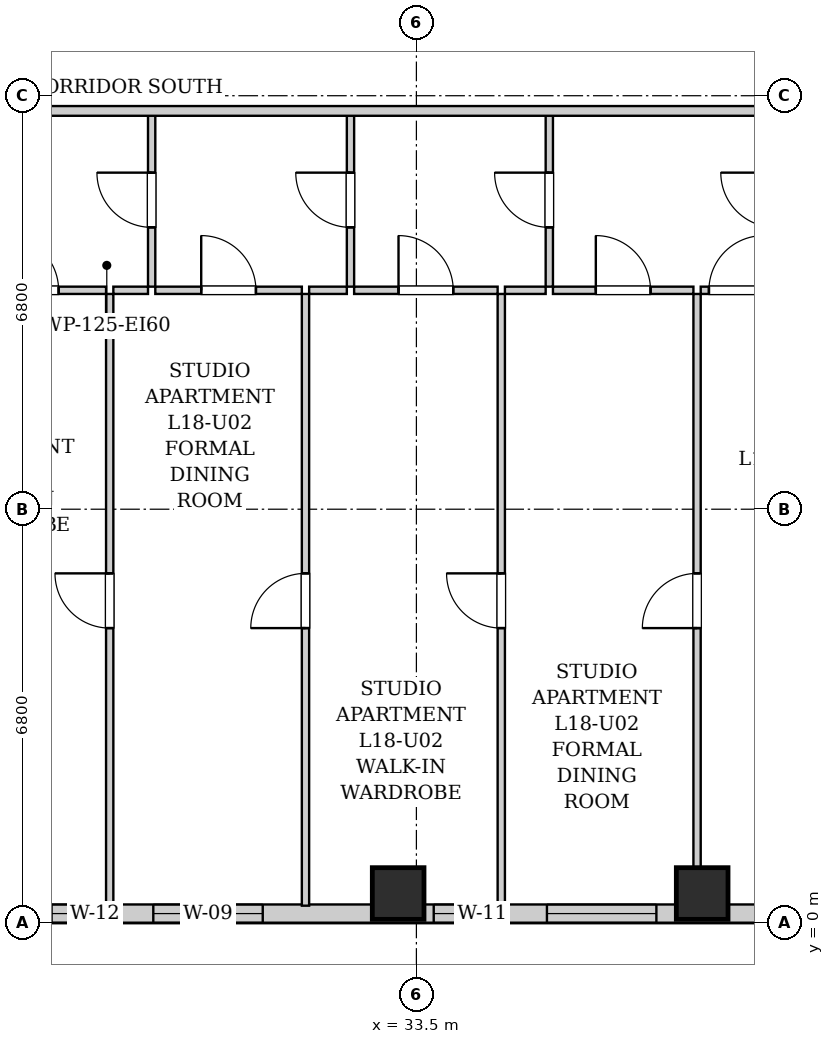
"""IFC4 building model, lengths in metres.
Left out: names, types, materials, properties, quantities, classifications, styles, units other than length and angle.
Written with IfcOpenShell. Run it as: python <this file> out.ifc"""

import sys

from ifc_helpers import new_model, si_unit, direction, frame, frame_2d, origin, origin_2d, place, context, subcontext, project, spatial, rectangle, extrude, element, fill, save


model = new_model("IFC4")
c1 = context("Model", 3, precision=1e-05, world=origin(), true_north=direction((0.0, 1.0)))
c2 = subcontext(c1, "Body", "Model", "MODEL_VIEW")
j1 = project(units=[si_unit("LENGTHUNIT", "METRE"), si_unit("PLANEANGLEUNIT", "RADIAN")], contexts=[c1])
p1 = place(None, origin())
s1 = spatial("IfcSite", under=j1, at=p1, CompositionType="ELEMENT")
p2 = place(p1, origin())
s2 = spatial("IfcBuilding", under=s1, at=p2, CompositionType="ELEMENT")
p3 = place(p2, frame((0.0, 0.0, 67.4)))
s3 = spatial("IfcBuildingStorey", under=s2, at=p3, CompositionType="ELEMENT", Elevation=67.4)
for number, where, z_axis, x_axis in (
    (1, (33.2, 0.48, 0.0), (0.0, 0.0, 1.0), (1.0, 0.0, 0.0)),
    (2, (38.2, 0.48, 0.0), (0.0, 0.0, 1.0), (1.0, 0.0, 0.0)),
):
    element("IfcColumn", number, at=place(p3, frame(where, z_axis=z_axis, x_axis=x_axis)), inside=s3, PredefinedType="COLUMN", context=c2, shape_type="SweptSolid", body=[
        extrude(rectangle(XDim=0.85, YDim=0.85, at=origin_2d()), origin(), (0.0, 0.0, 1.0), 3.2),
    ])
p4 = place(p3, frame((44.0, 0.15, 0.0), z_axis=(0.0, 0.0, 1.0), x_axis=(-1.0, 0.0, 0.0)))
e3 = element("IfcWall", 3, at=p4, inside=s3, PredefinedType="SOLIDWALL", context=c2, shape_type="SweptSolid", body=[
    extrude(rectangle(XDim=26.35, YDim=0.3, at=frame_2d((13.175, 0.0))), origin(), (0.0, 0.0, 1.0), 1.915),
])
p5 = place(p4, frame((22.665, 0.0, 0.55)))
e4 = element("IfcOpeningElement", 4, at=p5, cuts=e3, PredefinedType="OPENING", context=c2, shape_type="SweptSolid", body=[
    extrude(rectangle(XDim=1.8, YDim=1.2, at=frame_2d((0.9, 0.6))), frame((0.0, 0.16, 0.0), z_axis=(0.0, -1.0, 0.0), x_axis=(1.0, 0.0, 0.0)), (0.0, 0.0, 1.0), 0.32),
])
p6 = place(p4, frame((15.82, 0.0, 0.55)))
e5 = element("IfcOpeningElement", 5, at=p6, cuts=e3, PredefinedType="OPENING", context=c2, shape_type="SweptSolid", body=[
    extrude(rectangle(XDim=0.68, YDim=1.2, at=frame_2d((0.34, 0.6))), frame((0.0, 0.16, 0.0), z_axis=(0.0, -1.0, 0.0), x_axis=(1.0, 0.0, 0.0)), (0.0, 0.0, 1.0), 0.32),
])
p7 = place(p4, frame((13.027, 0.0, 0.55)))
e6 = element("IfcOpeningElement", 6, at=p7, cuts=e3, PredefinedType="OPENING", context=c2, shape_type="SweptSolid", body=[
    extrude(rectangle(XDim=1.8, YDim=1.2, at=frame_2d((0.9, 0.6))), frame((0.0, 0.16, 0.0), z_axis=(0.0, -1.0, 0.0), x_axis=(1.0, 0.0, 0.0)), (0.0, 0.0, 1.0), 0.32),
])
p8 = place(p4, frame((9.365, 0.0, 0.55)))
e7 = element("IfcOpeningElement", 7, at=p8, cuts=e3, PredefinedType="OPENING", context=c2, shape_type="SweptSolid", body=[
    extrude(rectangle(XDim=0.85, YDim=1.2, at=frame_2d((0.425, 0.6))), frame((0.0, 0.16, 0.0), z_axis=(0.0, -1.0, 0.0), x_axis=(1.0, 0.0, 0.0)), (0.0, 0.0, 1.0), 0.32),
])
p9 = place(p4, frame((6.553, 0.0, 0.55)))
e8 = element("IfcOpeningElement", 8, at=p9, cuts=e3, PredefinedType="OPENING", context=c2, shape_type="SweptSolid", body=[
    extrude(rectangle(XDim=1.8, YDim=1.2, at=frame_2d((0.9, 0.6))), frame((0.0, 0.16, 0.0), z_axis=(0.0, -1.0, 0.0), x_axis=(1.0, 0.0, 0.0)), (0.0, 0.0, 1.0), 0.32),
])
p10 = place(p4, frame((2.262, 0.0, 0.55)))
e9 = element("IfcOpeningElement", 9, at=p10, cuts=e3, PredefinedType="OPENING", context=c2, shape_type="SweptSolid", body=[
    extrude(rectangle(XDim=1.8, YDim=1.2, at=frame_2d((0.9, 0.6))), frame((0.0, 0.16, 0.0), z_axis=(0.0, -1.0, 0.0), x_axis=(1.0, 0.0, 0.0)), (0.0, 0.0, 1.0), 0.32),
])
p11 = place(p3, frame((29.146, 10.46, 0.0), z_axis=(0.0, 0.0, 1.0), x_axis=(0.0, 1.0, 0.0)))
e10 = element("IfcWall", 10, at=p11, inside=s3, PredefinedType="PARTITIONING", context=c2, shape_type="SweptSolid", body=[
    extrude(rectangle(XDim=2.85, YDim=0.12, at=frame_2d((1.425, 0.0))), origin(), (0.0, 0.0, 1.0), 2.88),
])
p12 = place(p11, frame((0.975, 0.0, 0.0)))
e11 = element("IfcOpeningElement", 11, at=p12, cuts=e10, PredefinedType="OPENING", context=c2, shape_type="SweptSolid", body=[
    extrude(rectangle(XDim=0.9, YDim=2.05, at=frame_2d((0.45, 1.025))), frame((0.0, 0.07, 0.0), z_axis=(0.0, -1.0, 0.0), x_axis=(1.0, 0.0, 0.0)), (0.0, 0.0, 1.0), 0.14),
])
p13 = place(p3, frame((25.936, 10.4, 0.0), z_axis=(0.0, 0.0, 1.0), x_axis=(1.0, 0.0, 0.0)))
e12 = element("IfcWall", 12, at=p13, inside=s3, PredefinedType="PARTITIONING", context=c2, shape_type="SweptSolid", body=[
    extrude(rectangle(XDim=2.46, YDim=0.12, at=frame_2d((1.23, 0.0))), origin(), (0.0, 0.0, 1.0), 2.88),
])
p14 = place(p13, frame((0.78, 0.0, 0.0)))
e13 = element("IfcOpeningElement", 13, at=p14, cuts=e12, PredefinedType="OPENING", context=c2, shape_type="SweptSolid", body=[
    extrude(rectangle(XDim=0.9, YDim=2.05, at=frame_2d((0.45, 1.025))), frame((0.0, 0.07, 0.0), z_axis=(0.0, -1.0, 0.0), x_axis=(1.0, 0.0, 0.0)), (0.0, 0.0, 1.0), 0.14),
])
p15 = place(p3, frame((28.516, 10.4, 0.0), z_axis=(0.0, 0.0, 1.0), x_axis=(1.0, 0.0, 0.0)))
e14 = element("IfcWall", 14, at=p15, inside=s3, PredefinedType="PARTITIONING", context=c2, shape_type="SweptSolid", body=[
    extrude(rectangle(XDim=0.57, YDim=0.12, at=frame_2d((0.285, 0.0))), origin(), (0.0, 0.0, 1.0), 2.88),
])
p16 = place(p3, frame((32.416, 10.46, 0.0), z_axis=(0.0, 0.0, 1.0), x_axis=(0.0, 1.0, 0.0)))
e15 = element("IfcWall", 15, at=p16, inside=s3, PredefinedType="PARTITIONING", context=c2, shape_type="SweptSolid", body=[
    extrude(rectangle(XDim=2.85, YDim=0.12, at=frame_2d((1.425, 0.0))), origin(), (0.0, 0.0, 1.0), 2.88),
])
p17 = place(p16, frame((0.975, 0.0, 0.0)))
e16 = element("IfcOpeningElement", 16, at=p17, cuts=e15, PredefinedType="OPENING", context=c2, shape_type="SweptSolid", body=[
    extrude(rectangle(XDim=0.9, YDim=2.05, at=frame_2d((0.45, 1.025))), frame((0.0, 0.07, 0.0), z_axis=(0.0, -1.0, 0.0), x_axis=(1.0, 0.0, 0.0)), (0.0, 0.0, 1.0), 0.14),
])
p18 = place(p3, frame((29.206, 10.4, 0.0), z_axis=(0.0, 0.0, 1.0), x_axis=(1.0, 0.0, 0.0)))
e17 = element("IfcWall", 17, at=p18, inside=s3, PredefinedType="PARTITIONING", context=c2, shape_type="SweptSolid", body=[
    extrude(rectangle(XDim=2.41, YDim=0.12, at=frame_2d((1.205, 0.0))), origin(), (0.0, 0.0, 1.0), 2.88),
])
p19 = place(p18, frame((0.755, 0.0, 0.0)))
e18 = element("IfcOpeningElement", 18, at=p19, cuts=e17, PredefinedType="OPENING", context=c2, shape_type="SweptSolid", body=[
    extrude(rectangle(XDim=0.9, YDim=2.05, at=frame_2d((0.45, 1.025))), frame((0.0, 0.07, 0.0), z_axis=(0.0, -1.0, 0.0), x_axis=(1.0, 0.0, 0.0)), (0.0, 0.0, 1.0), 0.14),
])
p20 = place(p3, frame((31.736, 10.4, 0.0), z_axis=(0.0, 0.0, 1.0), x_axis=(1.0, 0.0, 0.0)))
e19 = element("IfcWall", 19, at=p20, inside=s3, PredefinedType="PARTITIONING", context=c2, shape_type="SweptSolid", body=[
    extrude(rectangle(XDim=0.62, YDim=0.12, at=frame_2d((0.31, 0.0))), origin(), (0.0, 0.0, 1.0), 2.88),
])
p21 = place(p3, frame((35.686, 10.46, 0.0), z_axis=(0.0, 0.0, 1.0), x_axis=(0.0, 1.0, 0.0)))
e20 = element("IfcWall", 20, at=p21, inside=s3, PredefinedType="PARTITIONING", context=c2, shape_type="SweptSolid", body=[
    extrude(rectangle(XDim=2.85, YDim=0.12, at=frame_2d((1.425, 0.0))), origin(), (0.0, 0.0, 1.0), 2.88),
])
p22 = place(p21, frame((0.975, 0.0, 0.0)))
e21 = element("IfcOpeningElement", 21, at=p22, cuts=e20, PredefinedType="OPENING", context=c2, shape_type="SweptSolid", body=[
    extrude(rectangle(XDim=0.9, YDim=2.05, at=frame_2d((0.45, 1.025))), frame((0.0, 0.07, 0.0), z_axis=(0.0, -1.0, 0.0), x_axis=(1.0, 0.0, 0.0)), (0.0, 0.0, 1.0), 0.14),
])
p23 = place(p3, frame((32.476, 10.4, 0.0), z_axis=(0.0, 0.0, 1.0), x_axis=(1.0, 0.0, 0.0)))
e22 = element("IfcWall", 22, at=p23, inside=s3, PredefinedType="PARTITIONING", context=c2, shape_type="SweptSolid", body=[
    extrude(rectangle(XDim=2.36, YDim=0.12, at=frame_2d((1.18, 0.0))), origin(), (0.0, 0.0, 1.0), 2.88),
])
p24 = place(p23, frame((0.73, 0.0, 0.0)))
e23 = element("IfcOpeningElement", 23, at=p24, cuts=e22, PredefinedType="OPENING", context=c2, shape_type="SweptSolid", body=[
    extrude(rectangle(XDim=0.9, YDim=2.05, at=frame_2d((0.45, 1.025))), frame((0.0, 0.07, 0.0), z_axis=(0.0, -1.0, 0.0), x_axis=(1.0, 0.0, 0.0)), (0.0, 0.0, 1.0), 0.14),
])
p25 = place(p3, frame((34.956, 10.4, 0.0), z_axis=(0.0, 0.0, 1.0), x_axis=(1.0, 0.0, 0.0)))
e24 = element("IfcWall", 24, at=p25, inside=s3, PredefinedType="PARTITIONING", context=c2, shape_type="SweptSolid", body=[
    extrude(rectangle(XDim=0.67, YDim=0.12, at=frame_2d((0.335, 0.0))), origin(), (0.0, 0.0, 1.0), 2.88),
])
p26 = place(p3, frame((35.746, 10.4, 0.0), z_axis=(0.0, 0.0, 1.0), x_axis=(1.0, 0.0, 0.0)))
e25 = element("IfcWall", 25, at=p26, inside=s3, PredefinedType="PARTITIONING", context=c2, shape_type="SweptSolid", body=[
    extrude(rectangle(XDim=2.31, YDim=0.12, at=frame_2d((1.155, 0.0))), origin(), (0.0, 0.0, 1.0), 2.88),
])
p27 = place(p26, frame((0.705, 0.0, 0.0)))
e26 = element("IfcOpeningElement", 26, at=p27, cuts=e25, PredefinedType="OPENING", context=c2, shape_type="SweptSolid", body=[
    extrude(rectangle(XDim=0.9, YDim=2.05, at=frame_2d((0.45, 1.025))), frame((0.0, 0.07, 0.0), z_axis=(0.0, -1.0, 0.0), x_axis=(1.0, 0.0, 0.0)), (0.0, 0.0, 1.0), 0.14),
])
p28 = place(p3, frame((38.176, 10.4, 0.0), z_axis=(0.0, 0.0, 1.0), x_axis=(1.0, 0.0, 0.0)))
e27 = element("IfcWall", 27, at=p28, inside=s3, PredefinedType="PARTITIONING", context=c2, shape_type="SweptSolid", body=[
    extrude(rectangle(XDim=1.17, YDim=0.12, at=frame_2d((0.585, 0.0))), origin(), (0.0, 0.0, 1.0), 2.88),
])
p29 = place(p28, frame((0.135, 0.0, 0.0)))
e28 = element("IfcOpeningElement", 28, at=p29, cuts=e27, PredefinedType="OPENING", context=c2, shape_type="SweptSolid", body=[
    extrude(rectangle(XDim=0.9, YDim=2.05, at=frame_2d((0.45, 1.025))), frame((0.0, 0.07, 0.0), z_axis=(0.0, -1.0, 0.0), x_axis=(1.0, 0.0, 0.0)), (0.0, 0.0, 1.0), 0.14),
])
p30 = place(p3, frame((28.456, 0.28, 0.0), z_axis=(0.0, 0.0, 1.0), x_axis=(0.0, 1.0, 0.0)))
e29 = element("IfcWall", 29, at=p30, inside=s3, PredefinedType="PARTITIONING", context=c2, shape_type="SweptSolid", body=[
    extrude(rectangle(XDim=10.06, YDim=0.12, at=frame_2d((5.03, 0.0))), origin(), (0.0, 0.0, 1.0), 2.88),
])
p31 = place(p30, frame((4.565, 0.0, 0.0)))
e30 = element("IfcOpeningElement", 30, at=p31, cuts=e29, PredefinedType="OPENING", context=c2, shape_type="SweptSolid", body=[
    extrude(rectangle(XDim=0.9, YDim=2.05, at=frame_2d((0.45, 1.025))), frame((0.0, 0.07, 0.0), z_axis=(0.0, -1.0, 0.0), x_axis=(1.0, 0.0, 0.0)), (0.0, 0.0, 1.0), 0.14),
])
p32 = place(p3, frame((31.676, 0.28, 0.0), z_axis=(0.0, 0.0, 1.0), x_axis=(0.0, 1.0, 0.0)))
e31 = element("IfcWall", 31, at=p32, inside=s3, PredefinedType="PARTITIONING", context=c2, shape_type="SweptSolid", body=[
    extrude(rectangle(XDim=10.06, YDim=0.12, at=frame_2d((5.03, 0.0))), origin(), (0.0, 0.0, 1.0), 2.88),
])
p33 = place(p32, frame((4.565, 0.0, 0.0)))
e32 = element("IfcOpeningElement", 32, at=p33, cuts=e31, PredefinedType="OPENING", context=c2, shape_type="SweptSolid", body=[
    extrude(rectangle(XDim=0.9, YDim=2.05, at=frame_2d((0.45, 1.025))), frame((0.0, 0.07, 0.0), z_axis=(0.0, -1.0, 0.0), x_axis=(1.0, 0.0, 0.0)), (0.0, 0.0, 1.0), 0.14),
])
p34 = place(p3, frame((34.896, 0.28, 0.0), z_axis=(0.0, 0.0, 1.0), x_axis=(0.0, 1.0, 0.0)))
e33 = element("IfcWall", 33, at=p34, inside=s3, PredefinedType="PARTITIONING", context=c2, shape_type="SweptSolid", body=[
    extrude(rectangle(XDim=10.06, YDim=0.12, at=frame_2d((5.03, 0.0))), origin(), (0.0, 0.0, 1.0), 2.88),
])
p35 = place(p34, frame((4.565, 0.0, 0.0)))
e34 = element("IfcOpeningElement", 34, at=p35, cuts=e33, PredefinedType="OPENING", context=c2, shape_type="SweptSolid", body=[
    extrude(rectangle(XDim=0.9, YDim=2.05, at=frame_2d((0.45, 1.025))), frame((0.0, 0.07, 0.0), z_axis=(0.0, -1.0, 0.0), x_axis=(1.0, 0.0, 0.0)), (0.0, 0.0, 1.0), 0.14),
])
p36 = place(p3, frame((38.116, 0.28, 0.0), z_axis=(0.0, 0.0, 1.0), x_axis=(0.0, 1.0, 0.0)))
e35 = element("IfcWall", 35, at=p36, inside=s3, PredefinedType="PARTITIONING", context=c2, shape_type="SweptSolid", body=[
    extrude(rectangle(XDim=10.06, YDim=0.12, at=frame_2d((5.03, 0.0))), origin(), (0.0, 0.0, 1.0), 2.88),
])
p37 = place(p36, frame((4.565, 0.0, 0.0)))
e36 = element("IfcOpeningElement", 36, at=p37, cuts=e35, PredefinedType="OPENING", context=c2, shape_type="SweptSolid", body=[
    extrude(rectangle(XDim=0.9, YDim=2.05, at=frame_2d((0.45, 1.025))), frame((0.0, 0.07, 0.0), z_axis=(0.0, -1.0, 0.0), x_axis=(1.0, 0.0, 0.0)), (0.0, 0.0, 1.0), 0.14),
])
p38 = place(p3, frame((10.05, 13.35, 0.0), z_axis=(0.0, 0.0, 1.0), x_axis=(1.0, 0.0, 0.0)))
e37 = element("IfcWall", 37, at=p38, inside=s3, PredefinedType="PARTITIONING", context=c2, shape_type="SweptSolid", body=[
    extrude(rectangle(XDim=33.9, YDim=0.16, at=frame_2d((16.95, 0.0))), origin(), (0.0, 0.0, 1.0), 2.88),
])
p39 = place(p38, frame((3.8, 0.0, 0.0)))
e38 = element("IfcOpeningElement", 38, at=p39, cuts=e37, PredefinedType="OPENING", context=c2, shape_type="SweptSolid", body=[
    extrude(rectangle(XDim=0.95, YDim=2.1, at=frame_2d((0.475, 1.05))), frame((0.0, 0.09, 0.0), z_axis=(0.0, -1.0, 0.0), x_axis=(1.0, 0.0, 0.0)), (0.0, 0.0, 1.0), 0.18),
])
p40 = place(p38, frame((13.071, 0.0, 0.0)))
e39 = element("IfcOpeningElement", 39, at=p40, cuts=e37, PredefinedType="OPENING", context=c2, shape_type="SweptSolid", body=[
    extrude(rectangle(XDim=0.95, YDim=2.1, at=frame_2d((0.475, 1.05))), frame((0.0, 0.09, 0.0), z_axis=(0.0, -1.0, 0.0), x_axis=(1.0, 0.0, 0.0)), (0.0, 0.0, 1.0), 0.18),
])
p41 = place(p12, origin())
e40 = element("IfcDoor", 40, at=p41, inside=s3, OperationType="SINGLE_SWING_RIGHT", PredefinedType="DOOR", context=c2, shape_type="SweptSolid", body=[
    extrude(rectangle(XDim=0.9, YDim=2.05, at=frame_2d((0.45, 1.025))), frame((0.0, 0.025, 0.0), z_axis=(0.0, -1.0, 0.0), x_axis=(1.0, 0.0, 0.0)), (0.0, 0.0, 1.0), 0.05),
])
fill(e11, e40)
p42 = place(p14, origin())
e41 = element("IfcDoor", 41, at=p42, inside=s3, OperationType="SINGLE_SWING_LEFT", PredefinedType="DOOR", context=c2, shape_type="SweptSolid", body=[
    extrude(rectangle(XDim=0.9, YDim=2.05, at=frame_2d((0.45, 1.025))), frame((0.0, 0.025, 0.0), z_axis=(0.0, -1.0, 0.0), x_axis=(1.0, 0.0, 0.0)), (0.0, 0.0, 1.0), 0.05),
])
fill(e13, e41)
p43 = place(p17, origin())
e42 = element("IfcDoor", 42, at=p43, inside=s3, OperationType="SINGLE_SWING_RIGHT", PredefinedType="DOOR", context=c2, shape_type="SweptSolid", body=[
    extrude(rectangle(XDim=0.9, YDim=2.05, at=frame_2d((0.45, 1.025))), frame((0.0, 0.025, 0.0), z_axis=(0.0, -1.0, 0.0), x_axis=(1.0, 0.0, 0.0)), (0.0, 0.0, 1.0), 0.05),
])
fill(e16, e42)
p44 = place(p19, origin())
e43 = element("IfcDoor", 43, at=p44, inside=s3, OperationType="SINGLE_SWING_LEFT", PredefinedType="DOOR", context=c2, shape_type="SweptSolid", body=[
    extrude(rectangle(XDim=0.9, YDim=2.05, at=frame_2d((0.45, 1.025))), frame((0.0, 0.025, 0.0), z_axis=(0.0, -1.0, 0.0), x_axis=(1.0, 0.0, 0.0)), (0.0, 0.0, 1.0), 0.05),
])
fill(e18, e43)
p45 = place(p22, origin())
e44 = element("IfcDoor", 44, at=p45, inside=s3, OperationType="SINGLE_SWING_RIGHT", PredefinedType="DOOR", context=c2, shape_type="SweptSolid", body=[
    extrude(rectangle(XDim=0.9, YDim=2.05, at=frame_2d((0.45, 1.025))), frame((0.0, 0.025, 0.0), z_axis=(0.0, -1.0, 0.0), x_axis=(1.0, 0.0, 0.0)), (0.0, 0.0, 1.0), 0.05),
])
fill(e21, e44)
p46 = place(p24, origin())
e45 = element("IfcDoor", 45, at=p46, inside=s3, OperationType="SINGLE_SWING_LEFT", PredefinedType="DOOR", context=c2, shape_type="SweptSolid", body=[
    extrude(rectangle(XDim=0.9, YDim=2.05, at=frame_2d((0.45, 1.025))), frame((0.0, 0.025, 0.0), z_axis=(0.0, -1.0, 0.0), x_axis=(1.0, 0.0, 0.0)), (0.0, 0.0, 1.0), 0.05),
])
fill(e23, e45)
p47 = place(p27, origin())
e46 = element("IfcDoor", 46, at=p47, inside=s3, OperationType="SINGLE_SWING_LEFT", PredefinedType="DOOR", context=c2, shape_type="SweptSolid", body=[
    extrude(rectangle(XDim=0.9, YDim=2.05, at=frame_2d((0.45, 1.025))), frame((0.0, 0.025, 0.0), z_axis=(0.0, -1.0, 0.0), x_axis=(1.0, 0.0, 0.0)), (0.0, 0.0, 1.0), 0.05),
])
fill(e26, e46)
p48 = place(p29, origin())
e47 = element("IfcDoor", 47, at=p48, inside=s3, OperationType="SINGLE_SWING_RIGHT", PredefinedType="DOOR", context=c2, shape_type="SweptSolid", body=[
    extrude(rectangle(XDim=0.9, YDim=2.05, at=frame_2d((0.45, 1.025))), frame((0.0, 0.025, 0.0), z_axis=(0.0, -1.0, 0.0), x_axis=(1.0, 0.0, 0.0)), (0.0, 0.0, 1.0), 0.05),
])
fill(e28, e47)
p49 = place(p31, origin())
e48 = element("IfcDoor", 48, at=p49, inside=s3, OperationType="SINGLE_SWING_RIGHT", PredefinedType="DOOR", context=c2, shape_type="SweptSolid", body=[
    extrude(rectangle(XDim=0.9, YDim=2.05, at=frame_2d((0.45, 1.025))), frame((0.0, 0.025, 0.0), z_axis=(0.0, -1.0, 0.0), x_axis=(1.0, 0.0, 0.0)), (0.0, 0.0, 1.0), 0.05),
])
fill(e30, e48)
p50 = place(p33, origin())
e49 = element("IfcDoor", 49, at=p50, inside=s3, OperationType="SINGLE_SWING_LEFT", PredefinedType="DOOR", context=c2, shape_type="SweptSolid", body=[
    extrude(rectangle(XDim=0.9, YDim=2.05, at=frame_2d((0.45, 1.025))), frame((0.0, 0.025, 0.0), z_axis=(0.0, -1.0, 0.0), x_axis=(1.0, 0.0, 0.0)), (0.0, 0.0, 1.0), 0.05),
])
fill(e32, e49)
p51 = place(p35, origin())
e50 = element("IfcDoor", 50, at=p51, inside=s3, OperationType="SINGLE_SWING_RIGHT", PredefinedType="DOOR", context=c2, shape_type="SweptSolid", body=[
    extrude(rectangle(XDim=0.9, YDim=2.05, at=frame_2d((0.45, 1.025))), frame((0.0, 0.025, 0.0), z_axis=(0.0, -1.0, 0.0), x_axis=(1.0, 0.0, 0.0)), (0.0, 0.0, 1.0), 0.05),
])
fill(e34, e50)
p52 = place(p37, origin())
e51 = element("IfcDoor", 51, at=p52, inside=s3, OperationType="SINGLE_SWING_LEFT", PredefinedType="DOOR", context=c2, shape_type="SweptSolid", body=[
    extrude(rectangle(XDim=0.9, YDim=2.05, at=frame_2d((0.45, 1.025))), frame((0.0, 0.025, 0.0), z_axis=(0.0, -1.0, 0.0), x_axis=(1.0, 0.0, 0.0)), (0.0, 0.0, 1.0), 0.05),
])
fill(e36, e51)
p53 = place(p6, origin())
e52 = element("IfcWindow", 52, at=p53, inside=s3, PartitioningType="SINGLE_PANEL", PredefinedType="WINDOW", context=c2, shape_type="SweptSolid", body=[
    extrude(rectangle(XDim=0.68, YDim=1.2, at=frame_2d((0.34, 0.6))), frame((0.0, 0.03, 0.0), z_axis=(0.0, -1.0, 0.0), x_axis=(1.0, 0.0, 0.0)), (0.0, 0.0, 1.0), 0.06),
])
fill(e5, e52)
p54 = place(p7, origin())
e53 = element("IfcWindow", 53, at=p54, inside=s3, PartitioningType="DOUBLE_PANEL_VERTICAL", PredefinedType="WINDOW", context=c2, shape_type="SweptSolid", body=[
    extrude(rectangle(XDim=1.8, YDim=1.2, at=frame_2d((0.9, 0.6))), frame((0.0, 0.03, 0.0), z_axis=(0.0, -1.0, 0.0), x_axis=(1.0, 0.0, 0.0)), (0.0, 0.0, 1.0), 0.06),
])
fill(e6, e53)
p55 = place(p8, origin())
e54 = element("IfcWindow", 54, at=p55, inside=s3, PartitioningType="SINGLE_PANEL", PredefinedType="WINDOW", context=c2, shape_type="SweptSolid", body=[
    extrude(rectangle(XDim=0.85, YDim=1.2, at=frame_2d((0.425, 0.6))), frame((0.0, 0.03, 0.0), z_axis=(0.0, -1.0, 0.0), x_axis=(1.0, 0.0, 0.0)), (0.0, 0.0, 1.0), 0.06),
])
fill(e7, e54)
p56 = place(p9, origin())
e55 = element("IfcWindow", 55, at=p56, inside=s3, PartitioningType="DOUBLE_PANEL_VERTICAL", PredefinedType="WINDOW", context=c2, shape_type="SweptSolid", body=[
    extrude(rectangle(XDim=1.8, YDim=1.2, at=frame_2d((0.9, 0.6))), frame((0.0, 0.03, 0.0), z_axis=(0.0, -1.0, 0.0), x_axis=(1.0, 0.0, 0.0)), (0.0, 0.0, 1.0), 0.06),
])
fill(e8, e55)
save(model, sys.argv[1])
